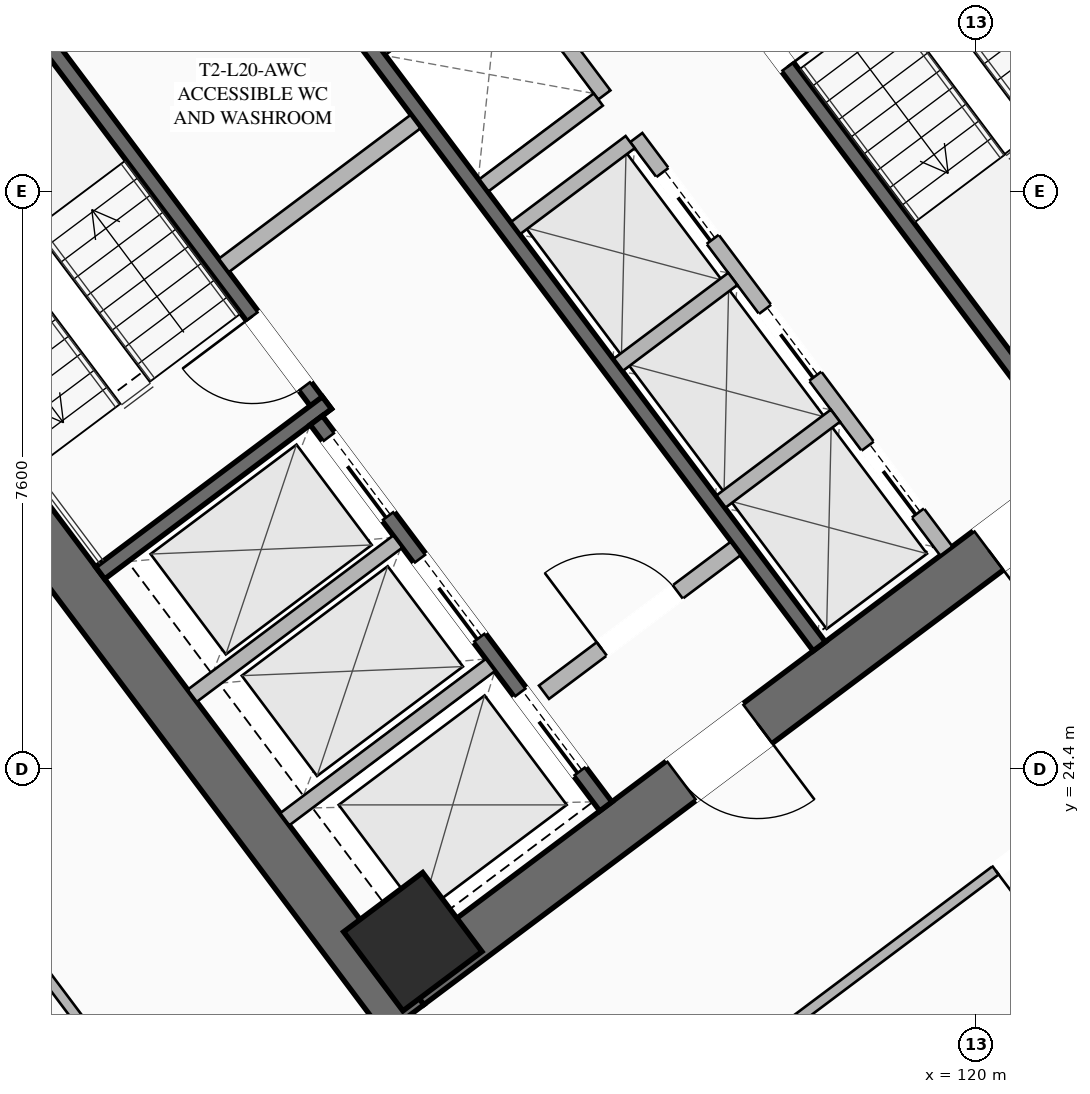
"""IFC4 building model, lengths in metres.
Left out: names, types, materials, properties, quantities, classifications, styles, units other than length and angle.
Written with IfcOpenShell. Run it as: python <this file> out.ifc"""

import sys

from ifc_helpers import new_model, si_unit, direction, frame, frame_2d, origin, origin_2d, place, context, subcontext, project, spatial, rectangle, hollow_rectangle, extrude, element, fill, save


model = new_model("IFC4")
c1 = context("Model", 3, precision=1e-05, world=origin(), true_north=direction((0.0, 1.0)))
c2 = subcontext(c1, "Body", "Model", "MODEL_VIEW")
j1 = project(units=[si_unit("LENGTHUNIT", "METRE"), si_unit("PLANEANGLEUNIT", "RADIAN")], contexts=[c1])
p1 = place(None, origin())
s1 = spatial("IfcSite", under=j1, at=p1, CompositionType="ELEMENT")
p2 = place(p1, origin())
s2 = spatial("IfcBuilding", under=s1, at=p2, CompositionType="ELEMENT")
p3 = place(p2, frame((0.0, 0.0, 77.85)))
s3 = spatial("IfcBuildingStorey", under=s2, at=p3, CompositionType="ELEMENT", Elevation=77.85)
for number, where, z_axis, x_axis in (
    (1, (112.476, 21.107, 0.0), (0.0, 0.0, 1.0), (-0.6, 0.8, 0.0)),
    (2, (115.524, 42.893, 0.0), (0.0, 0.0, 1.0), (0.6, -0.8, 0.0)),
):
    element("IfcWall", number, at=place(p3, frame(where, z_axis=z_axis, x_axis=x_axis)), inside=s3, PredefinedType="SHEAR", context=c2, shape_type="SweptSolid", body=[
        extrude(rectangle(XDim=15.6, YDim=0.65, at=frame_2d((7.8, 0.0))), origin(), (0.0, 0.0, 1.0), 3.55),
    ])
p4 = place(p3, frame((124.429, 30.478, 0.0), z_axis=(0.0, 0.0, 1.0), x_axis=(-0.799998028465, -0.600002628705, 0.0)))
e3 = element("IfcWall", 3, at=p4, inside=s3, PredefinedType="SHEAR", context=c2, shape_type="SweptSolid", body=[
    extrude(rectangle(XDim=14.86, YDim=0.65, at=frame_2d((7.43, 0.0))), origin(), (0.0, 0.0, 1.0), 3.55),
])
p5 = place(p4, frame((9.13, 0.0, 0.0)))
e4 = element("IfcOpeningElement", 4, at=p5, cuts=e3, PredefinedType="OPENING", context=c2, shape_type="SweptSolid", body=[
    extrude(rectangle(XDim=1.25, YDim=2.25, at=frame_2d((0.625, 1.125))), frame((0.0, 0.335, 0.0), z_axis=(0.0, -1.0, 0.0), x_axis=(1.0, 0.0, 0.0)), (0.0, 0.0, 1.0), 0.67),
])
p6 = place(p4, frame((4.08, 0.0, 0.0)))
e5 = element("IfcOpeningElement", 5, at=p6, cuts=e3, PredefinedType="OPENING", context=c2, shape_type="SweptSolid", body=[
    extrude(rectangle(XDim=1.25, YDim=2.25, at=frame_2d((0.625, 1.125))), frame((0.0, 0.335, 0.0), z_axis=(0.0, -1.0, 0.0), x_axis=(1.0, 0.0, 0.0)), (0.0, 0.0, 1.0), 0.67),
])
p7 = place(p3, frame((103.571, 33.522, 0.0), z_axis=(0.0, 0.0, 1.0), x_axis=(0.799998028465, 0.600002628705, 0.0)))
e6 = element("IfcWall", 6, at=p7, inside=s3, PredefinedType="SHEAR", context=c2, shape_type="SweptSolid", body=[
    extrude(rectangle(XDim=14.86, YDim=0.65, at=frame_2d((7.43, 0.0))), origin(), (0.0, 0.0, 1.0), 3.55),
])
p8 = place(p7, frame((4.48, 0.0, 0.0)))
e7 = element("IfcOpeningElement", 7, at=p8, cuts=e6, PredefinedType="OPENING", context=c2, shape_type="SweptSolid", body=[
    extrude(rectangle(XDim=1.25, YDim=2.25, at=frame_2d((0.625, 1.125))), frame((0.0, 0.335, 0.0), z_axis=(0.0, -1.0, 0.0), x_axis=(1.0, 0.0, 0.0)), (0.0, 0.0, 1.0), 0.67),
])
p9 = place(p7, frame((9.53, 0.0, 0.0)))
e8 = element("IfcOpeningElement", 8, at=p9, cuts=e6, PredefinedType="OPENING", context=c2, shape_type="SweptSolid", body=[
    extrude(rectangle(XDim=1.25, YDim=2.25, at=frame_2d((0.625, 1.125))), frame((0.0, 0.335, 0.0), z_axis=(0.0, -1.0, 0.0), x_axis=(1.0, 0.0, 0.0)), (0.0, 0.0, 1.0), 0.67),
])
p10 = place(p3, frame((112.59, 22.13, 0.0), z_axis=(0.0, 0.0, 1.0), x_axis=(0.799999996291, 0.600000004945, 0.0)))
e9 = element("IfcColumn", 9, at=p10, inside=s3, PredefinedType="COLUMN", context=c2, shape_type="SweptSolid", body=[
    extrude(hollow_rectangle(XDim=1.3, YDim=1.3, WallThickness=0.05, at=origin_2d()), origin(), (0.0, 0.0, 1.0), 3.35),
])
p11 = place(p3, frame((111.44, 29.08, 0.0), z_axis=(0.0, 0.0, 1.0), x_axis=(-0.600009827119, 0.799992629566, 0.0)))
e10 = element("IfcWall", 10, at=p11, inside=s3, PredefinedType="SHEAR", context=c2, shape_type="SweptSolid", body=[
    extrude(rectangle(XDim=7.95, YDim=0.2, at=frame_2d((3.975, 0.0))), origin(), (0.0, 0.0, 1.0), 3.35),
])
p12 = place(p11, frame((0.45, 0.0, 0.0)))
e11 = element("IfcOpeningElement", 11, at=p12, cuts=e10, PredefinedType="OPENING", context=c2, shape_type="SweptSolid", body=[
    extrude(rectangle(XDim=1.15, YDim=2.2, at=frame_2d((0.575, 1.1))), frame((0.0, 0.11, 0.0), z_axis=(0.0, -1.0, 0.0), x_axis=(1.0, 0.0, 0.0)), (0.0, 0.0, 1.0), 0.22),
])
p13 = place(p3, frame((108.476, 26.982, 0.0), z_axis=(0.0, 0.0, 1.0), x_axis=(0.799984290658, 0.600020945218, 0.0)))
e12 = element("IfcWall", 12, at=p13, inside=s3, PredefinedType="SHEAR", context=c2, shape_type="SweptSolid", body=[
    extrude(rectangle(XDim=3.73, YDim=0.2, at=frame_2d((1.865, 0.0))), origin(), (0.0, 0.0, 1.0), 3.35),
])
p14 = place(p3, frame((116.56, 34.92, 0.0), z_axis=(0.0, 0.0, 1.0), x_axis=(0.600009827119, -0.799992629566, 0.0)))
e13 = element("IfcWall", 13, at=p14, inside=s3, PredefinedType="SHEAR", context=c2, shape_type="SweptSolid", body=[
    extrude(rectangle(XDim=7.95, YDim=0.2, at=frame_2d((3.975, 0.0))), origin(), (0.0, 0.0, 1.0), 3.35),
])
p15 = place(p14, frame((0.45, 0.0, 0.0)))
e14 = element("IfcOpeningElement", 14, at=p15, cuts=e13, PredefinedType="OPENING", context=c2, shape_type="SweptSolid", body=[
    extrude(rectangle(XDim=1.15, YDim=2.2, at=frame_2d((0.575, 1.1))), frame((0.0, 0.11, 0.0), z_axis=(0.0, -1.0, 0.0), x_axis=(1.0, 0.0, 0.0)), (0.0, 0.0, 1.0), 0.22),
])
p16 = place(p3, frame((117.938, 26.016, 0.0), z_axis=(0.0, 0.0, 1.0), x_axis=(-0.600005463273, 0.799995902516, 0.0)))
e15 = element("IfcWall", 15, at=p16, inside=s3, PredefinedType="SHEAR", context=c2, shape_type="SweptSolid", body=[
    extrude(rectangle(XDim=14.3, YDim=0.2, at=frame_2d((7.15, 0.0))), origin(), (0.0, 0.0, 1.0), 3.35),
])
p17 = place(p3, frame((110.104, 31.028, 0.0), z_axis=(0.0, 0.0, 1.0), x_axis=(0.800018601094, 0.59997519774, 0.0)))
e16 = element("IfcWall", 16, at=p17, inside=s3, PredefinedType="SOLIDWALL", context=c2, shape_type="SweptSolid", body=[
    extrude(rectangle(XDim=3.15, YDim=0.22, at=frame_2d((1.575, 0.0))), origin(), (0.0, 0.0, 1.0), 2.703),
])
p18 = place(p3, frame((114.316, 25.412, 0.0), z_axis=(0.0, 0.0, 1.0), x_axis=(0.800018601094, 0.59997519774, 0.0)))
e17 = element("IfcWall", 17, at=p18, inside=s3, PredefinedType="SOLIDWALL", context=c2, shape_type="SweptSolid", body=[
    extrude(rectangle(XDim=3.15, YDim=0.22, at=frame_2d((1.575, 0.0))), origin(), (0.0, 0.0, 1.0), 2.703),
])
p19 = place(p18, frame((0.95, 0.0, 0.0)))
e18 = element("IfcOpeningElement", 18, at=p19, cuts=e17, PredefinedType="OPENING", context=c2, shape_type="SweptSolid", body=[
    extrude(rectangle(XDim=1.25, YDim=2.25, at=frame_2d((0.625, 1.125))), frame((0.0, 0.12, 0.0), z_axis=(0.0, -1.0, 0.0), x_axis=(1.0, 0.0, 0.0)), (0.0, 0.0, 1.0), 0.24),
])
p20 = place(p3, frame((115.13, 23.91, 0.0), z_axis=(0.0, 0.0, 1.0), x_axis=(-0.599975393228, 0.800018454488, 0.0)))
e19 = element("IfcWall", 19, at=p20, inside=s3, PredefinedType="SHEAR", context=c2, shape_type="SweptSolid", body=[
    extrude(rectangle(XDim=6.35, YDim=0.2, at=frame_2d((3.175, 0.0))), origin(), (0.0, 0.0, 1.0), 3.35),
])
p21 = place(p20, frame((4.775, 0.0, 0.0)))
e20 = element("IfcOpeningElement", 20, at=p21, cuts=e19, PredefinedType="OPENING", context=c2, shape_type="SweptSolid", body=[
    extrude(rectangle(XDim=1.3, YDim=2.25, at=frame_2d((0.65, 1.125))), frame((0.0, 0.11, 0.0), z_axis=(0.0, -1.0, 0.0), x_axis=(1.0, 0.0, 0.0)), (0.0, 0.0, 1.0), 0.22),
])
p22 = place(p20, frame((2.775, 0.0, 0.0)))
e21 = element("IfcOpeningElement", 21, at=p22, cuts=e19, PredefinedType="OPENING", context=c2, shape_type="SweptSolid", body=[
    extrude(rectangle(XDim=1.3, YDim=2.25, at=frame_2d((0.65, 1.125))), frame((0.0, 0.11, 0.0), z_axis=(0.0, -1.0, 0.0), x_axis=(1.0, 0.0, 0.0)), (0.0, 0.0, 1.0), 0.22),
])
p23 = place(p20, frame((0.575, 0.0, 0.0)))
e22 = element("IfcOpeningElement", 22, at=p23, cuts=e19, PredefinedType="OPENING", context=c2, shape_type="SweptSolid", body=[
    extrude(rectangle(XDim=1.3, YDim=2.25, at=frame_2d((0.65, 1.125))), frame((0.0, 0.11, 0.0), z_axis=(0.0, -1.0, 0.0), x_axis=(1.0, 0.0, 0.0)), (0.0, 0.0, 1.0), 0.22),
])
for number, where, z_axis, x_axis in (
    (23, (110.906, 23.742, 0.0), (0.0, 0.0, 1.0), (0.8, 0.6, 0.0)),
    (24, (109.688, 25.366, 0.0), (0.0, 0.0, 1.0), (0.8, 0.6, 0.0)),
):
    element("IfcWall", number, at=place(p3, frame(where, z_axis=z_axis, x_axis=x_axis)), inside=s3, PredefinedType="SOLIDWALL", context=c2, shape_type="SweptSolid", body=[
        extrude(rectangle(XDim=3.38, YDim=0.2, at=frame_2d((1.69, 0.0))), origin(), (0.0, 0.0, 1.0), 3.35),
    ])
p24 = place(p3, frame((119.61, 27.27, 0.0), z_axis=(0.0, 0.0, 1.0), x_axis=(-0.600011488909, 0.79999138319, 0.0)))
e25 = element("IfcWall", 25, at=p24, inside=s3, PredefinedType="SOLIDWALL", context=c2, shape_type="SweptSolid", body=[
    extrude(rectangle(XDim=6.8, YDim=0.2, at=frame_2d((3.4, 0.0))), origin(), (0.0, 0.0, 1.0), 3.35),
])
p25 = place(p24, frame((0.625, 0.0, 0.0)))
e26 = element("IfcOpeningElement", 26, at=p25, cuts=e25, PredefinedType="OPENING", context=c2, shape_type="SweptSolid", body=[
    extrude(rectangle(XDim=1.1, YDim=2.2, at=frame_2d((0.55, 1.1))), frame((0.0, 0.11, 0.0), z_axis=(0.0, -1.0, 0.0), x_axis=(1.0, 0.0, 0.0)), (0.0, 0.0, 1.0), 0.22),
])
p26 = place(p24, frame((2.875, 0.0, 0.0)))
e27 = element("IfcOpeningElement", 27, at=p26, cuts=e25, PredefinedType="OPENING", context=c2, shape_type="SweptSolid", body=[
    extrude(rectangle(XDim=1.1, YDim=2.2, at=frame_2d((0.55, 1.1))), frame((0.0, 0.11, 0.0), z_axis=(0.0, -1.0, 0.0), x_axis=(1.0, 0.0, 0.0)), (0.0, 0.0, 1.0), 0.22),
])
p27 = place(p24, frame((5.125, 0.0, 0.0)))
e28 = element("IfcOpeningElement", 28, at=p27, cuts=e25, PredefinedType="OPENING", context=c2, shape_type="SweptSolid", body=[
    extrude(rectangle(XDim=1.1, YDim=2.2, at=frame_2d((0.55, 1.1))), frame((0.0, 0.11, 0.0), z_axis=(0.0, -1.0, 0.0), x_axis=(1.0, 0.0, 0.0)), (0.0, 0.0, 1.0), 0.22),
])
p28 = place(p3, frame((116.646, 27.922, 0.0), z_axis=(0.0, 0.0, 1.0), x_axis=(0.8, 0.6, 0.0)))
e29 = element("IfcWall", 29, at=p28, inside=s3, PredefinedType="SOLIDWALL", context=c2, shape_type="SweptSolid", body=[
    extrude(rectangle(XDim=1.88, YDim=0.2, at=frame_2d((0.94, 0.0))), origin(), (0.0, 0.0, 1.0), 3.35),
])
p29 = place(p3, frame((115.296, 29.722, 0.0), z_axis=(0.0, 0.0, 1.0), x_axis=(0.799984418148, 0.600020775241, 0.0)))
e30 = element("IfcWall", 30, at=p29, inside=s3, PredefinedType="SOLIDWALL", context=c2, shape_type="SweptSolid", body=[
    extrude(rectangle(XDim=1.88, YDim=0.2, at=frame_2d((0.94, 0.0))), origin(), (0.0, 0.0, 1.0), 3.35),
])
p30 = place(p3, frame((113.946, 31.522, 0.0), z_axis=(0.0, 0.0, 1.0), x_axis=(0.8, 0.6, 0.0)))
e31 = element("IfcWall", 31, at=p30, inside=s3, PredefinedType="SOLIDWALL", context=c2, shape_type="SweptSolid", body=[
    extrude(rectangle(XDim=1.88, YDim=0.2, at=frame_2d((0.94, 0.0))), origin(), (0.0, 0.0, 1.0), 3.35),
])
p31 = place(p3, frame((115.11, 33.27, 0.0), z_axis=(0.0, 0.0, 1.0), x_axis=(-0.600011488909, 0.79999138319, 0.0)))
e32 = element("IfcWall", 32, at=p31, inside=s3, PredefinedType="SOLIDWALL", context=c2, shape_type="SweptSolid", body=[
    extrude(rectangle(XDim=6.8, YDim=0.2, at=frame_2d((3.4, 0.0))), origin(), (0.0, 0.0, 1.0), 3.35),
])
p32 = place(p3, frame((113.526, 32.082, 0.0), z_axis=(0.0, 0.0, 1.0), x_axis=(0.800046745961, 0.599937666993, 0.0)))
e33 = element("IfcWall", 33, at=p32, inside=s3, PredefinedType="SOLIDWALL", context=c2, shape_type="SweptSolid", body=[
    extrude(rectangle(XDim=1.88, YDim=0.2, at=frame_2d((0.94, 0.0))), origin(), (0.0, 0.0, 1.0), 3.35),
])
p33 = place(p3, frame((112.176, 33.882, 0.0), z_axis=(0.0, 0.0, 1.0), x_axis=(0.8, 0.6, 0.0)))
e34 = element("IfcWall", 34, at=p33, inside=s3, PredefinedType="SOLIDWALL", context=c2, shape_type="SweptSolid", body=[
    extrude(rectangle(XDim=1.88, YDim=0.2, at=frame_2d((0.94, 0.0))), origin(), (0.0, 0.0, 1.0), 3.35),
])
p34 = place(p3, frame((134.18, 33.51, 0.0), z_axis=(0.0, 0.0, 1.0), x_axis=(-0.8, -0.6, 0.0)))
e35 = element("IfcWall", 35, at=p34, inside=s3, PredefinedType="PARTITIONING", context=c2, shape_type="SweptSolid", body=[
    extrude(rectangle(XDim=28.23, YDim=0.135, at=frame_2d((14.115, 0.0))), origin(), (0.0, 0.0, 1.0), 2.703),
])
p35 = place(p34, frame((26.9, 0.0, 0.0)))
e36 = element("IfcOpeningElement", 36, at=p35, cuts=e35, PredefinedType="OPENING", context=c2, shape_type="SweptSolid", body=[
    extrude(rectangle(XDim=0.95, YDim=2.05, at=frame_2d((0.475, 1.025))), frame((0.0, 0.077, 0.0), z_axis=(0.0, -1.0, 0.0), x_axis=(1.0, 0.0, 0.0)), (0.0, 0.0, 1.0), 0.155),
])
p36 = place(p34, frame((16.453, 0.0, 0.0)))
e37 = element("IfcOpeningElement", 37, at=p36, cuts=e35, PredefinedType="OPENING", context=c2, shape_type="SweptSolid", body=[
    extrude(rectangle(XDim=0.95, YDim=2.05, at=frame_2d((0.475, 1.025))), frame((0.0, 0.077, 0.0), z_axis=(0.0, -1.0, 0.0), x_axis=(1.0, 0.0, 0.0)), (0.0, 0.0, 1.0), 0.155),
])
p37 = place(p34, frame((0.38, 0.0, 0.0)))
e38 = element("IfcOpeningElement", 38, at=p37, cuts=e35, PredefinedType="OPENING", context=c2, shape_type="SweptSolid", body=[
    extrude(rectangle(XDim=0.95, YDim=2.05, at=frame_2d((0.475, 1.025))), frame((0.0, 0.077, 0.0), z_axis=(0.0, -1.0, 0.0), x_axis=(1.0, 0.0, 0.0)), (0.0, 0.0, 1.0), 0.155),
])
p38 = place(p3, frame((111.548, 16.636, 0.0), z_axis=(0.0, 0.0, 1.0), x_axis=(-0.600003610192, 0.799997292343, 0.0)))
e39 = element("IfcWall", 39, at=p38, inside=s3, PredefinedType="PARTITIONING", context=c2, shape_type="SweptSolid", body=[
    extrude(rectangle(XDim=21.64, YDim=0.135, at=frame_2d((10.82, 0.0))), origin(), (0.0, 0.0, 1.0), 2.703),
])
p39 = place(p38, frame((0.3, 0.0, 0.0)))
e40 = element("IfcOpeningElement", 40, at=p39, cuts=e39, PredefinedType="OPENING", context=c2, shape_type="SweptSolid", body=[
    extrude(rectangle(XDim=0.95, YDim=2.05, at=frame_2d((0.475, 1.025))), frame((0.0, 0.077, 0.0), z_axis=(0.0, -1.0, 0.0), x_axis=(1.0, 0.0, 0.0)), (0.0, 0.0, 1.0), 0.155),
])
p40 = place(p5, origin())
e41 = element("IfcDoor", 41, at=p40, inside=s3, OperationType="SINGLE_SWING_LEFT", PredefinedType="DOOR", context=c2, shape_type="SweptSolid", body=[
    extrude(rectangle(XDim=1.25, YDim=2.25, at=frame_2d((0.625, 1.125))), frame((0.0, 0.025, 0.0), z_axis=(0.0, -1.0, 0.0), x_axis=(1.0, 0.0, 0.0)), (0.0, 0.0, 1.0), 0.05),
])
fill(e4, e41)
p41 = place(p6, origin())
e42 = element("IfcDoor", 42, at=p41, inside=s3, OperationType="SINGLE_SWING_RIGHT", PredefinedType="DOOR", context=c2, shape_type="SweptSolid", body=[
    extrude(rectangle(XDim=1.25, YDim=2.25, at=frame_2d((0.625, 1.125))), frame((0.0, 0.025, 0.0), z_axis=(0.0, -1.0, 0.0), x_axis=(1.0, 0.0, 0.0)), (0.0, 0.0, 1.0), 0.05),
])
fill(e5, e42)
p42 = place(p12, origin())
e43 = element("IfcDoor", 43, at=p42, inside=s3, OperationType="SINGLE_SWING_RIGHT", PredefinedType="DOOR", context=c2, shape_type="SweptSolid", body=[
    extrude(rectangle(XDim=1.15, YDim=2.2, at=frame_2d((0.575, 1.1))), frame((0.0, 0.025, 0.0), z_axis=(0.0, -1.0, 0.0), x_axis=(1.0, 0.0, 0.0)), (0.0, 0.0, 1.0), 0.05),
])
fill(e11, e43)
p43 = place(p15, origin())
e44 = element("IfcDoor", 44, at=p43, inside=s3, OperationType="SINGLE_SWING_RIGHT", PredefinedType="DOOR", context=c2, shape_type="SweptSolid", body=[
    extrude(rectangle(XDim=1.15, YDim=2.2, at=frame_2d((0.575, 1.1))), frame((0.0, 0.025, 0.0), z_axis=(0.0, -1.0, 0.0), x_axis=(1.0, 0.0, 0.0)), (0.0, 0.0, 1.0), 0.05),
])
fill(e14, e44)
p44 = place(p19, origin())
e45 = element("IfcDoor", 45, at=p44, inside=s3, OperationType="SINGLE_SWING_LEFT", PredefinedType="DOOR", context=c2, shape_type="SweptSolid", body=[
    extrude(rectangle(XDim=1.25, YDim=2.25, at=frame_2d((0.625, 1.125))), frame((0.0, 0.025, 0.0), z_axis=(0.0, -1.0, 0.0), x_axis=(1.0, 0.0, 0.0)), (0.0, 0.0, 1.0), 0.05),
])
fill(e18, e45)
p45 = place(p36, origin())
e46 = element("IfcDoor", 46, at=p45, inside=s3, OperationType="SINGLE_SWING_RIGHT", PredefinedType="DOOR", context=c2, shape_type="SweptSolid", body=[
    extrude(rectangle(XDim=0.95, YDim=2.05, at=frame_2d((0.475, 1.025))), frame((0.0, 0.025, 0.0), z_axis=(0.0, -1.0, 0.0), x_axis=(1.0, 0.0, 0.0)), (0.0, 0.0, 1.0), 0.05),
])
fill(e37, e46)
p46 = place(p21, origin())
e47 = element("IfcDoor", 47, at=p46, inside=s3, OperationType="SLIDING_TO_LEFT", PredefinedType="DOOR", context=c2, shape_type="SweptSolid", body=[
    extrude(rectangle(XDim=1.3, YDim=2.25, at=frame_2d((0.65, 1.125))), frame((0.0, 0.025, 0.0), z_axis=(0.0, -1.0, 0.0), x_axis=(1.0, 0.0, 0.0)), (0.0, 0.0, 1.0), 0.05),
])
fill(e20, e47)
p47 = place(p22, origin())
e48 = element("IfcDoor", 48, at=p47, inside=s3, OperationType="SLIDING_TO_LEFT", PredefinedType="DOOR", context=c2, shape_type="SweptSolid", body=[
    extrude(rectangle(XDim=1.3, YDim=2.25, at=frame_2d((0.65, 1.125))), frame((0.0, 0.025, 0.0), z_axis=(0.0, -1.0, 0.0), x_axis=(1.0, 0.0, 0.0)), (0.0, 0.0, 1.0), 0.05),
])
fill(e21, e48)
p48 = place(p23, origin())
e49 = element("IfcDoor", 49, at=p48, inside=s3, OperationType="SLIDING_TO_LEFT", PredefinedType="DOOR", context=c2, shape_type="SweptSolid", body=[
    extrude(rectangle(XDim=1.3, YDim=2.25, at=frame_2d((0.65, 1.125))), frame((0.0, 0.025, 0.0), z_axis=(0.0, -1.0, 0.0), x_axis=(1.0, 0.0, 0.0)), (0.0, 0.0, 1.0), 0.05),
])
fill(e22, e49)
p49 = place(p25, origin())
e50 = element("IfcDoor", 50, at=p49, inside=s3, OperationType="SLIDING_TO_LEFT", PredefinedType="DOOR", context=c2, shape_type="SweptSolid", body=[
    extrude(rectangle(XDim=1.1, YDim=2.2, at=frame_2d((0.55, 1.1))), frame((0.0, 0.025, 0.0), z_axis=(0.0, -1.0, 0.0), x_axis=(1.0, 0.0, 0.0)), (0.0, 0.0, 1.0), 0.05),
])
fill(e26, e50)
p50 = place(p26, origin())
e51 = element("IfcDoor", 51, at=p50, inside=s3, OperationType="SLIDING_TO_LEFT", PredefinedType="DOOR", context=c2, shape_type="SweptSolid", body=[
    extrude(rectangle(XDim=1.1, YDim=2.2, at=frame_2d((0.55, 1.1))), frame((0.0, 0.025, 0.0), z_axis=(0.0, -1.0, 0.0), x_axis=(1.0, 0.0, 0.0)), (0.0, 0.0, 1.0), 0.05),
])
fill(e27, e51)
p51 = place(p27, origin())
e52 = element("IfcDoor", 52, at=p51, inside=s3, OperationType="SLIDING_TO_LEFT", PredefinedType="DOOR", context=c2, shape_type="SweptSolid", body=[
    extrude(rectangle(XDim=1.1, YDim=2.2, at=frame_2d((0.55, 1.1))), frame((0.0, 0.025, 0.0), z_axis=(0.0, -1.0, 0.0), x_axis=(1.0, 0.0, 0.0)), (0.0, 0.0, 1.0), 0.05),
])
fill(e28, e52)
save(model, sys.argv[1])
